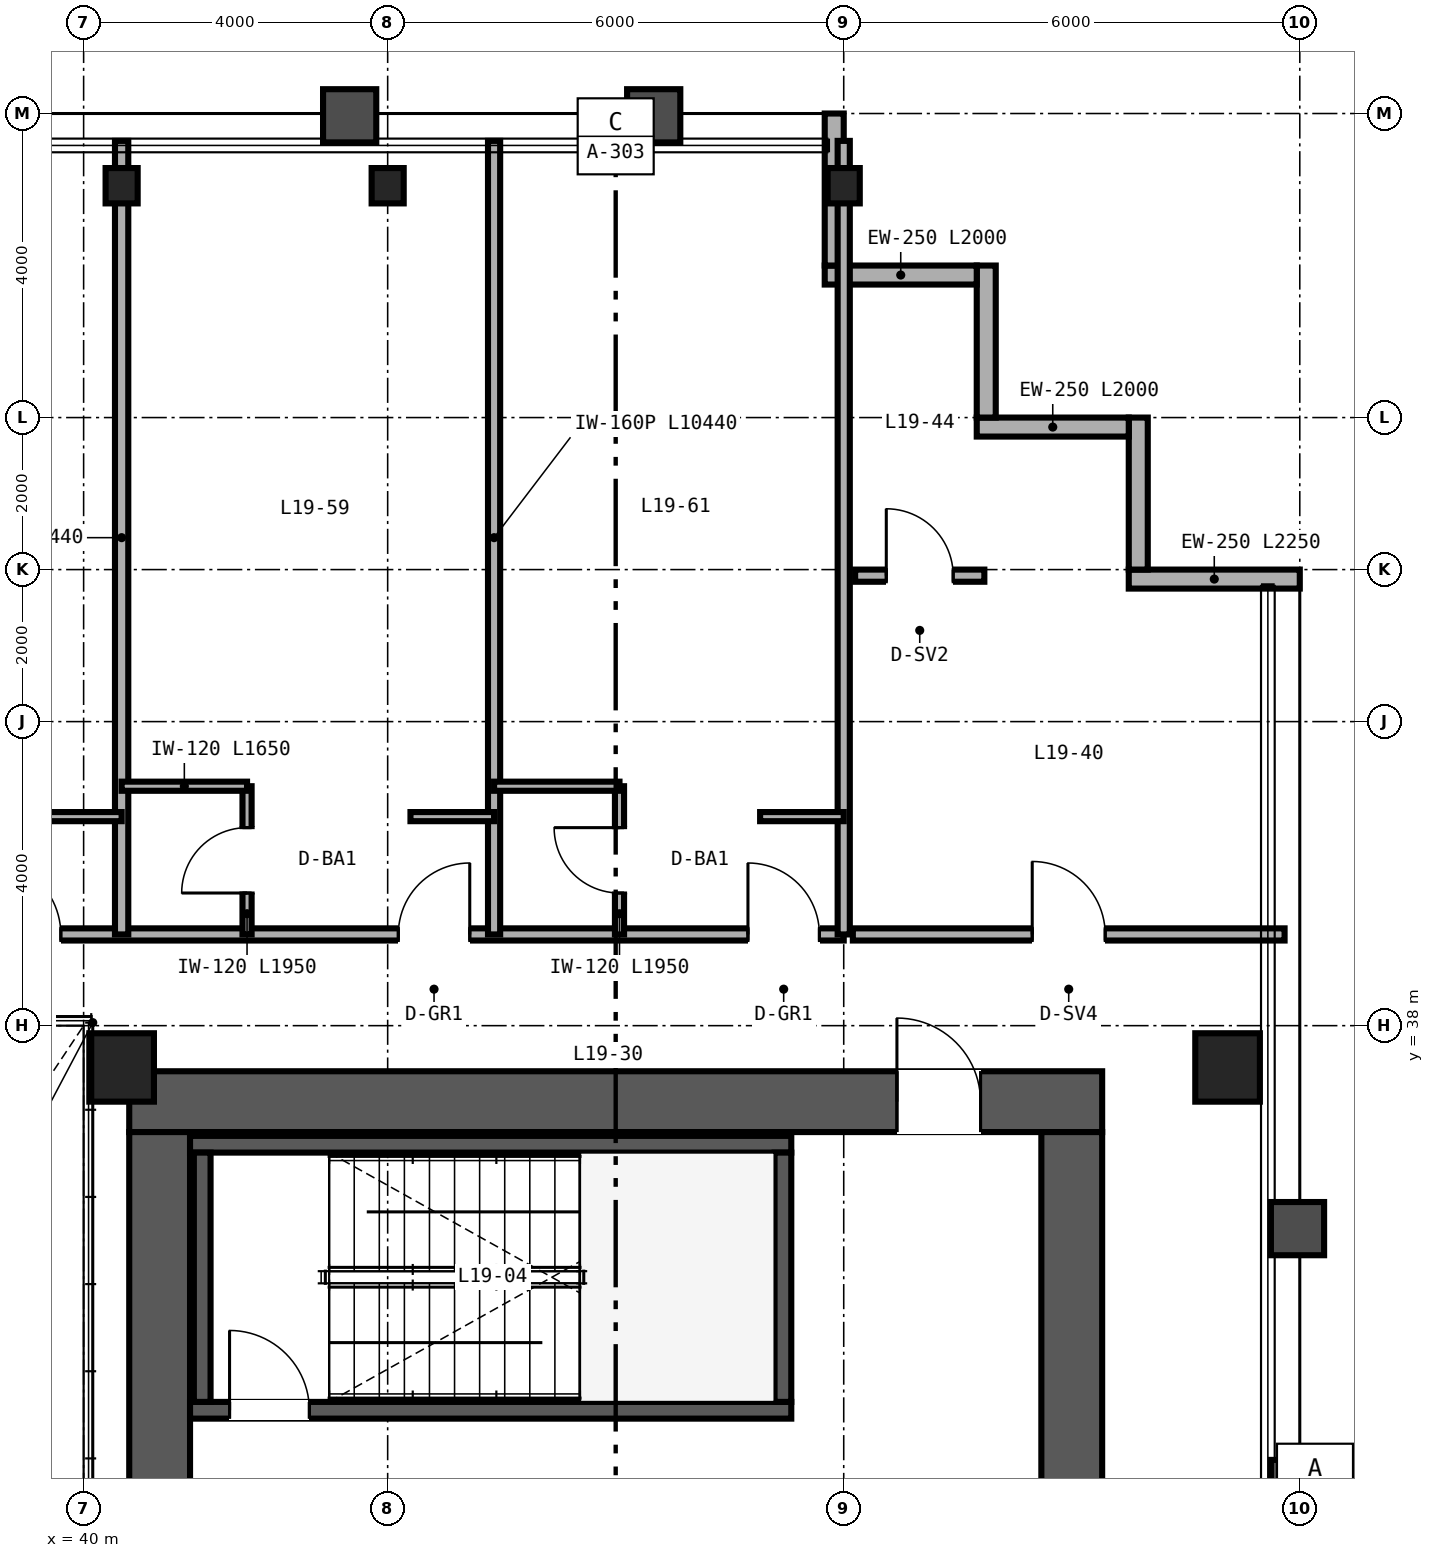
"""IFC4 building model, lengths in metres.
Left out: names, types, materials, properties, quantities, classifications, styles, units other than length and angle.
Written with IfcOpenShell. Run it as: python <this file> out.ifc"""

import sys

from ifc_helpers import new_model, si_unit, direction, frame, frame_2d, origin, origin_2d, place, context, subcontext, project, spatial, rectangle, hollow_rectangle, i_section, extrude, source, transform, mapped, element, fill, save


model = new_model("IFC4")
c1 = context("Model", 3, precision=1e-05, world=origin(), true_north=direction((0.0, 1.0)))
c2 = subcontext(c1, "Body", "Model", "MODEL_VIEW")
j1 = project(units=[si_unit("LENGTHUNIT", "METRE"), si_unit("PLANEANGLEUNIT", "RADIAN")], contexts=[c1])
p1 = place(None, origin())
s1 = spatial("IfcSite", under=j1, at=p1, CompositionType="ELEMENT")
p2 = place(p1, origin())
s2 = spatial("IfcBuilding", under=s1, at=p2, CompositionType="ELEMENT")
p3 = place(p2, frame((0.0, 0.0, 78.0)))
s3 = spatial("IfcBuildingStorey", under=s2, at=p3, CompositionType="ELEMENT", Elevation=78.0)
p4 = place(p3, frame((40.6, 37.0, 0.0), z_axis=(0.0, 0.0, 1.0), x_axis=(1.0, 0.0, 0.0)))
e1 = element("IfcWall", 1, at=p4, inside=s3, PredefinedType="SHEAR", context=c2, shape_type="SweptSolid", body=[
    extrude(rectangle(XDim=12.8, YDim=0.8, at=frame_2d((6.4, 0.0))), origin(), (0.0, 0.0, 1.0), 3.35),
])
p5 = place(p4, frame((10.1, 0.0, 0.0)))
e2 = element("IfcOpeningElement", 2, at=p5, cuts=e1, PredefinedType="OPENING", context=c2, shape_type="SweptSolid", body=[
    extrude(rectangle(XDim=1.1, YDim=2.15, at=frame_2d((0.55, 1.075))), frame((0.0, 0.41, 0.0), z_axis=(0.0, -1.0, 0.0), x_axis=(1.0, 0.0, 0.0)), (0.0, 0.0, 1.0), 0.82),
])
for number, where, z_axis, x_axis in (
    (3, (41.0, 15.4, 0.0), (0.0, 0.0, 1.0), (0.0, 1.0, 0.0)),
    (4, (53.0, 15.4, 0.0), (0.0, 0.0, 1.0), (0.0, 1.0, 0.0)),
):
    element("IfcWall", number, at=place(p3, frame(where, z_axis=z_axis, x_axis=x_axis)), inside=s3, PredefinedType="SHEAR", context=c2, shape_type="SweptSolid", body=[
        extrude(rectangle(XDim=21.2, YDim=0.8, at=frame_2d((10.6, 0.0))), origin(), (0.0, 0.0, 1.0), 3.35),
    ])
p6 = place(p3, frame((41.4, 32.94, 0.0), z_axis=(0.0, 0.0, 1.0), x_axis=(1.0, 0.0, 0.0)))
e5 = element("IfcWall", 5, at=p6, inside=s3, PredefinedType="SHEAR", context=c2, shape_type="SweptSolid", body=[
    extrude(rectangle(XDim=7.91, YDim=0.22, at=frame_2d((3.955, 0.0))), origin(), (0.0, 0.0, 1.0), 3.4),
])
p7 = place(p6, frame((0.52, 0.0, 0.0)))
e6 = element("IfcOpeningElement", 6, at=p7, cuts=e5, PredefinedType="OPENING", context=c2, shape_type="SweptSolid", body=[
    extrude(rectangle(XDim=1.05, YDim=2.15, at=frame_2d((0.525, 1.075))), frame((0.0, 0.12, 0.0), z_axis=(0.0, -1.0, 0.0), x_axis=(1.0, 0.0, 0.0)), (0.0, 0.0, 1.0), 0.24),
])
p8 = place(p3, frame((41.4, 36.44, 0.0), z_axis=(0.0, 0.0, 1.0), x_axis=(1.0, 0.0, 0.0)))
e7 = element("IfcWall", 7, at=p8, inside=s3, PredefinedType="SHEAR", context=c2, shape_type="SweptSolid", body=[
    extrude(rectangle(XDim=7.91, YDim=0.22, at=frame_2d((3.955, 0.0))), origin(), (0.0, 0.0, 1.0), 3.4),
])
for number, where, z_axis, x_axis in (
    (8, (41.56, 33.05, 0.0), (0.0, 0.0, 1.0), (0.0, 1.0, 0.0)),
    (9, (49.2, 33.05, 0.0), (0.0, 0.0, 1.0), (0.0, 1.0, 0.0)),
):
    element("IfcWall", number, at=place(p3, frame(where, z_axis=z_axis, x_axis=x_axis)), inside=s3, PredefinedType="SHEAR", context=c2, shape_type="SweptSolid", body=[
        extrude(rectangle(XDim=3.28, YDim=0.22, at=frame_2d((1.64, 0.0))), origin(), (0.0, 0.0, 1.0), 3.4),
    ])
m1 = source(origin(), c2, "Body", "SweptSolid", [
    extrude(hollow_rectangle(XDim=0.85, YDim=0.9, WallThickness=0.04, at=origin_2d()), origin(), (0.0, 0.0, 1.0), 3.35),
])
for number, where, z_axis, x_axis in (
    (10, (40.5, 37.45, 0.0), (0.0, 0.0, 1.0), (1.0, 0.0, 0.0)),
    (11, (55.05, 37.45, 0.0), (0.0, 0.0, 1.0), (1.0, 0.0, 0.0)),
):
    element("IfcColumn", number, at=place(p3, frame(where, z_axis=z_axis, x_axis=x_axis)), inside=s3, PredefinedType="COLUMN", context=c2, shape_type="MappedRepresentation", body=[
        mapped(m1, transform((0.0, 0.0, 0.0), scale=1.0)),
    ])
m2 = source(origin(), c2, "Body", "SweptSolid", [
    extrude(i_section(OverallWidth=0.422, OverallDepth=0.465, WebThickness=0.045, FlangeThickness=0.073, FilletRadius=0.025, at=origin_2d()), origin(), (0.0, 0.0, 1.0), 3.35),
])
for number, where, z_axis, x_axis in (
    (12, (40.5, 49.05, 0.0), (0.0, 0.0, 1.0), (1.0, 0.0, 0.0)),
    (13, (44.0, 49.05, 0.0), (0.0, 0.0, 1.0), (1.0, 0.0, 0.0)),
    (14, (50.0, 49.05, 0.0), (0.0, 0.0, 1.0), (1.0, 0.0, 0.0)),
):
    element("IfcColumn", number, at=place(p3, frame(where, z_axis=z_axis, x_axis=x_axis)), inside=s3, PredefinedType="COLUMN", context=c2, shape_type="MappedRepresentation", body=[
        mapped(m2, transform((0.0, 0.0, 0.0), scale=1.0)),
    ])
p9 = place(p3, frame((56.0, 43.875, 0.0), z_axis=(0.0, 0.0, 1.0), x_axis=(-1.0, 0.0, 0.0)))
e15 = element("IfcWall", 15, at=p9, inside=s3, PredefinedType="SOLIDWALL", context=c2, shape_type="SweptSolid", body=[
    extrude(rectangle(XDim=2.25, YDim=0.25, at=frame_2d((1.125, 0.0))), origin(), (0.0, 0.0, 1.0), 3.35),
])
for number, where, z_axis, x_axis in (
    (16, (53.875, 44.0, 0.0), (0.0, 0.0, 1.0), (0.0, 1.0, 0.0)),
    (17, (53.75, 45.875, 0.0), (0.0, 0.0, 1.0), (-1.0, 0.0, 0.0)),
    (18, (51.875, 46.0, 0.0), (0.0, 0.0, 1.0), (0.0, 1.0, 0.0)),
    (19, (51.75, 47.875, 0.0), (0.0, 0.0, 1.0), (-1.0, 0.0, 0.0)),
):
    element("IfcWall", number, at=place(p3, frame(where, z_axis=z_axis, x_axis=x_axis)), inside=s3, PredefinedType="SOLIDWALL", context=c2, shape_type="SweptSolid", body=[
        extrude(rectangle(XDim=2.0, YDim=0.25, at=frame_2d((1.0, 0.0))), origin(), (0.0, 0.0, 1.0), 3.35),
    ])
p10 = place(p3, frame((49.875, 48.0, 0.0), z_axis=(0.0, 0.0, 1.0), x_axis=(0.0, 1.0, 0.0)))
e20 = element("IfcWall", 20, at=p10, inside=s3, PredefinedType="SOLIDWALL", context=c2, shape_type="SweptSolid", body=[
    extrude(rectangle(XDim=2.0, YDim=0.25, at=frame_2d((1.0, 0.0))), origin(), (0.0, 0.0, 1.0), 2.657),
])
p11 = place(p3, frame((50.12, 39.2, 0.0), z_axis=(0.0, 0.0, 1.0), x_axis=(1.0, 0.0, 0.0)))
e21 = element("IfcWall", 21, at=p11, inside=s3, PredefinedType="PARTITIONING", context=c2, shape_type="SweptSolid", body=[
    extrude(rectangle(XDim=5.68, YDim=0.16, at=frame_2d((2.84, 0.0))), origin(), (0.0, 0.0, 1.0), 3.35),
])
p12 = place(p11, frame((2.36, 0.0, 0.0)))
e22 = element("IfcOpeningElement", 22, at=p12, cuts=e21, PredefinedType="OPENING", context=c2, shape_type="SweptSolid", body=[
    extrude(rectangle(XDim=0.96, YDim=2.15, at=frame_2d((0.48, 1.075))), frame((0.0, 0.09, 0.0), z_axis=(0.0, -1.0, 0.0), x_axis=(1.0, 0.0, 0.0)), (0.0, 0.0, 1.0), 0.18),
])
p13 = place(p3, frame((50.15, 43.92, 0.0), z_axis=(0.0, 0.0, 1.0), x_axis=(1.0, 0.0, 0.0)))
e23 = element("IfcWall", 23, at=p13, inside=s3, PredefinedType="PARTITIONING", context=c2, shape_type="SweptSolid", body=[
    extrude(rectangle(XDim=1.7, YDim=0.16, at=frame_2d((0.85, 0.0))), origin(), (0.0, 0.0, 1.0), 3.35),
])
p14 = place(p13, frame((0.41, 0.0, 0.0)))
e24 = element("IfcOpeningElement", 24, at=p14, cuts=e23, PredefinedType="OPENING", context=c2, shape_type="SweptSolid", body=[
    extrude(rectangle(XDim=0.88, YDim=2.15, at=frame_2d((0.44, 1.075))), frame((0.0, 0.09, 0.0), z_axis=(0.0, -1.0, 0.0), x_axis=(1.0, 0.0, 0.0)), (0.0, 0.0, 1.0), 0.18),
])
p15 = place(p3, frame((14.0, 39.2, 0.0), z_axis=(0.0, 0.0, 1.0), x_axis=(1.0, 0.0, 0.0)))
e25 = element("IfcWall", 25, at=p15, inside=s3, PredefinedType="PARTITIONING", context=c2, shape_type="SweptSolid", body=[
    extrude(rectangle(XDim=36.0, YDim=0.16, at=frame_2d((18.0, 0.0))), origin(), (0.0, 0.0, 1.0), 2.571),
])
p16 = place(p15, frame((7.7, 0.0, 0.0)))
e26 = element("IfcOpeningElement", 26, at=p16, cuts=e25, PredefinedType="OPENING", context=c2, shape_type="SweptSolid", body=[
    extrude(rectangle(XDim=0.98, YDim=2.2, at=frame_2d((0.49, 1.1))), frame((0.0, 0.09, 0.0), z_axis=(0.0, -1.0, 0.0), x_axis=(1.0, 0.0, 0.0)), (0.0, 0.0, 1.0), 0.18),
])
p17 = place(p15, frame((13.02, 0.0, 0.0)))
e27 = element("IfcOpeningElement", 27, at=p17, cuts=e25, PredefinedType="OPENING", context=c2, shape_type="SweptSolid", body=[
    extrude(rectangle(XDim=0.96, YDim=2.15, at=frame_2d((0.48, 1.075))), frame((0.0, 0.09, 0.0), z_axis=(0.0, -1.0, 0.0), x_axis=(1.0, 0.0, 0.0)), (0.0, 0.0, 1.0), 0.18),
])
p18 = place(p15, frame((24.72, 0.0, 0.0)))
e28 = element("IfcOpeningElement", 28, at=p18, cuts=e25, PredefinedType="OPENING", context=c2, shape_type="SweptSolid", body=[
    extrude(rectangle(XDim=0.98, YDim=2.2, at=frame_2d((0.49, 1.1))), frame((0.0, 0.09, 0.0), z_axis=(0.0, -1.0, 0.0), x_axis=(1.0, 0.0, 0.0)), (0.0, 0.0, 1.0), 0.18),
])
p19 = place(p15, frame((30.14, 0.0, 0.0)))
e29 = element("IfcOpeningElement", 29, at=p19, cuts=e25, PredefinedType="OPENING", context=c2, shape_type="SweptSolid", body=[
    extrude(rectangle(XDim=0.94, YDim=2.15, at=frame_2d((0.47, 1.075))), frame((0.0, 0.09, 0.0), z_axis=(0.0, -1.0, 0.0), x_axis=(1.0, 0.0, 0.0)), (0.0, 0.0, 1.0), 0.18),
])
p20 = place(p15, frame((34.74, 0.0, 0.0)))
e30 = element("IfcOpeningElement", 30, at=p20, cuts=e25, PredefinedType="OPENING", context=c2, shape_type="SweptSolid", body=[
    extrude(rectangle(XDim=0.94, YDim=2.15, at=frame_2d((0.47, 1.075))), frame((0.0, 0.09, 0.0), z_axis=(0.0, -1.0, 0.0), x_axis=(1.0, 0.0, 0.0)), (0.0, 0.0, 1.0), 0.18),
])
p21 = place(p3, frame((50.0, 39.2, 0.0), z_axis=(0.0, 0.0, 1.0), x_axis=(0.0, 1.0, 0.0)))
e31 = element("IfcWall", 31, at=p21, inside=s3, PredefinedType="PARTITIONING", context=c2, shape_type="SweptSolid", body=[
    extrude(rectangle(XDim=10.44, YDim=0.16, at=frame_2d((5.22, 0.0))), origin(), (0.0, 0.0, 1.0), 2.657),
])
p22 = place(p3, frame((40.5, 39.2, 0.0), z_axis=(0.0, 0.0, 1.0), x_axis=(0.0, 1.0, 0.0)))
e32 = element("IfcWall", 32, at=p22, inside=s3, PredefinedType="PARTITIONING", context=c2, shape_type="SweptSolid", body=[
    extrude(rectangle(XDim=10.44, YDim=0.175, at=frame_2d((5.22, 0.0))), origin(), (0.0, 0.0, 1.0), 2.423),
])
p23 = place(p3, frame((39.4, 40.75, 0.0), z_axis=(0.0, 0.0, 1.0), x_axis=(1.0, 0.0, 0.0)))
e33 = element("IfcWall", 33, at=p23, inside=s3, PredefinedType="PARTITIONING", context=c2, shape_type="SweptSolid", body=[
    extrude(rectangle(XDim=1.1, YDim=0.12, at=frame_2d((0.55, 0.0))), origin(), (0.0, 0.0, 1.0), 2.571),
])
p24 = place(p3, frame((45.4, 39.2, 0.0), z_axis=(0.0, 0.0, 1.0), x_axis=(0.0, 1.0, 0.0)))
e34 = element("IfcWall", 34, at=p24, inside=s3, PredefinedType="PARTITIONING", context=c2, shape_type="SweptSolid", body=[
    extrude(rectangle(XDim=10.44, YDim=0.16, at=frame_2d((5.22, 0.0))), origin(), (0.0, 0.0, 1.0), 2.657),
])
p25 = place(p3, frame((42.15, 39.2, 0.0), z_axis=(0.0, 0.0, 1.0), x_axis=(0.0, 1.0, 0.0)))
e35 = element("IfcWall", 35, at=p25, inside=s3, PredefinedType="PARTITIONING", context=c2, shape_type="SweptSolid", body=[
    extrude(rectangle(XDim=1.95, YDim=0.12, at=frame_2d((0.975, 0.0))), origin(), (0.0, 0.0, 1.0), 3.35),
])
p26 = place(p25, frame((0.545, 0.0, 0.0)))
e36 = element("IfcOpeningElement", 36, at=p26, cuts=e35, PredefinedType="OPENING", context=c2, shape_type="SweptSolid", body=[
    extrude(rectangle(XDim=0.86, YDim=2.1, at=frame_2d((0.43, 1.05))), frame((0.0, 0.07, 0.0), z_axis=(0.0, -1.0, 0.0), x_axis=(1.0, 0.0, 0.0)), (0.0, 0.0, 1.0), 0.14),
])
p27 = place(p3, frame((40.5, 41.15, 0.0), z_axis=(0.0, 0.0, 1.0), x_axis=(1.0, 0.0, 0.0)))
e37 = element("IfcWall", 37, at=p27, inside=s3, PredefinedType="PARTITIONING", context=c2, shape_type="SweptSolid", body=[
    extrude(rectangle(XDim=1.65, YDim=0.12, at=frame_2d((0.825, 0.0))), origin(), (0.0, 0.0, 1.0), 2.571),
])
p28 = place(p3, frame((44.3, 40.75, 0.0), z_axis=(0.0, 0.0, 1.0), x_axis=(1.0, 0.0, 0.0)))
e38 = element("IfcWall", 38, at=p28, inside=s3, PredefinedType="PARTITIONING", context=c2, shape_type="SweptSolid", body=[
    extrude(rectangle(XDim=1.1, YDim=0.12, at=frame_2d((0.55, 0.0))), origin(), (0.0, 0.0, 1.0), 3.35),
])
p29 = place(p3, frame((47.05, 39.2, 0.0), z_axis=(0.0, 0.0, 1.0), x_axis=(0.0, 1.0, 0.0)))
e39 = element("IfcWall", 39, at=p29, inside=s3, PredefinedType="PARTITIONING", context=c2, shape_type="SweptSolid", body=[
    extrude(rectangle(XDim=1.95, YDim=0.12, at=frame_2d((0.975, 0.0))), origin(), (0.0, 0.0, 1.0), 3.35),
])
p30 = place(p29, frame((0.545, 0.0, 0.0)))
e40 = element("IfcOpeningElement", 40, at=p30, cuts=e39, PredefinedType="OPENING", context=c2, shape_type="SweptSolid", body=[
    extrude(rectangle(XDim=0.86, YDim=2.1, at=frame_2d((0.43, 1.05))), frame((0.0, 0.07, 0.0), z_axis=(0.0, -1.0, 0.0), x_axis=(1.0, 0.0, 0.0)), (0.0, 0.0, 1.0), 0.14),
])
p31 = place(p3, frame((45.4, 41.15, 0.0), z_axis=(0.0, 0.0, 1.0), x_axis=(1.0, 0.0, 0.0)))
e41 = element("IfcWall", 41, at=p31, inside=s3, PredefinedType="PARTITIONING", context=c2, shape_type="SweptSolid", body=[
    extrude(rectangle(XDim=1.65, YDim=0.12, at=frame_2d((0.825, 0.0))), origin(), (0.0, 0.0, 1.0), 3.35),
])
p32 = place(p3, frame((48.9, 40.75, 0.0), z_axis=(0.0, 0.0, 1.0), x_axis=(1.0, 0.0, 0.0)))
e42 = element("IfcWall", 42, at=p32, inside=s3, PredefinedType="PARTITIONING", context=c2, shape_type="SweptSolid", body=[
    extrude(rectangle(XDim=1.1, YDim=0.12, at=frame_2d((0.55, 0.0))), origin(), (0.0, 0.0, 1.0), 3.35),
])
m3 = source(origin(), c2, "Body", "SweptSolid", [
    extrude(rectangle(XDim=1.05, YDim=2.15, at=frame_2d((0.525, 1.075))), frame((0.0, 0.025, 0.0), z_axis=(0.0, -1.0, 0.0), x_axis=(1.0, 0.0, 0.0)), (0.0, 0.0, 1.0), 0.05),
])
p33 = place(p7, origin())
e43 = element("IfcDoor", 43, at=p33, inside=s3, OperationType="SINGLE_SWING_LEFT", PredefinedType="DOOR", context=c2, shape_type="MappedRepresentation", body=[
    mapped(m3, transform((0.0, 0.0, 0.0), scale=1.0)),
])
fill(e6, e43)
m4 = source(origin(), c2, "Body", "SweptSolid", [
    extrude(rectangle(XDim=1.1, YDim=2.15, at=frame_2d((0.55, 1.075))), frame((0.0, 0.025, 0.0), z_axis=(0.0, -1.0, 0.0), x_axis=(1.0, 0.0, 0.0)), (0.0, 0.0, 1.0), 0.05),
])
p34 = place(p5, origin())
e44 = element("IfcDoor", 44, at=p34, inside=s3, OperationType="SINGLE_SWING_LEFT", PredefinedType="DOOR", context=c2, shape_type="MappedRepresentation", body=[
    mapped(m4, transform((0.0, 0.0, 0.0), scale=1.0)),
])
fill(e2, e44)
m5 = source(origin(), c2, "Body", "SweptSolid", [
    extrude(rectangle(XDim=0.96, YDim=2.15, at=frame_2d((0.48, 1.075))), frame((0.0, 0.025, 0.0), z_axis=(0.0, -1.0, 0.0), x_axis=(1.0, 0.0, 0.0)), (0.0, 0.0, 1.0), 0.05),
])
p35 = place(p12, origin())
e45 = element("IfcDoor", 45, at=p35, inside=s3, OperationType="SINGLE_SWING_LEFT", PredefinedType="DOOR", context=c2, shape_type="MappedRepresentation", body=[
    mapped(m5, transform((0.0, 0.0, 0.0), scale=1.0)),
])
fill(e22, e45)
m6 = source(origin(), c2, "Body", "SweptSolid", [
    extrude(rectangle(XDim=0.88, YDim=2.15, at=frame_2d((0.44, 1.075))), frame((0.0, 0.025, 0.0), z_axis=(0.0, -1.0, 0.0), x_axis=(1.0, 0.0, 0.0)), (0.0, 0.0, 1.0), 0.05),
])
p36 = place(p14, origin())
e46 = element("IfcDoor", 46, at=p36, inside=s3, OperationType="SINGLE_SWING_LEFT", PredefinedType="DOOR", context=c2, shape_type="MappedRepresentation", body=[
    mapped(m6, transform((0.0, 0.0, 0.0), scale=1.0)),
])
fill(e24, e46)
m7 = source(origin(), c2, "Body", "SweptSolid", [
    extrude(rectangle(XDim=0.86, YDim=2.1, at=frame_2d((0.43, 1.05))), frame((0.0, 0.025, 0.0), z_axis=(0.0, -1.0, 0.0), x_axis=(1.0, 0.0, 0.0)), (0.0, 0.0, 1.0), 0.05),
])
p37 = place(p26, origin())
e47 = element("IfcDoor", 47, at=p37, inside=s3, OperationType="SINGLE_SWING_LEFT", PredefinedType="DOOR", context=c2, shape_type="MappedRepresentation", body=[
    mapped(m7, transform((0.0, 0.0, 0.0), scale=1.0)),
])
fill(e36, e47)
p38 = place(p30, origin())
e48 = element("IfcDoor", 48, at=p38, inside=s3, OperationType="SINGLE_SWING_RIGHT", PredefinedType="DOOR", context=c2, shape_type="MappedRepresentation", body=[
    mapped(m7, transform((0.0, 0.0, 0.0), scale=1.0)),
])
fill(e40, e48)
m8 = source(origin(), c2, "Body", "SweptSolid", [
    extrude(rectangle(XDim=0.98, YDim=2.2, at=frame_2d((0.49, 1.1))), frame((0.0, 0.025, 0.0), z_axis=(0.0, -1.0, 0.0), x_axis=(1.0, 0.0, 0.0)), (0.0, 0.0, 1.0), 0.05),
])
p39 = place(p18, origin())
e49 = element("IfcDoor", 49, at=p39, inside=s3, OperationType="SINGLE_SWING_LEFT", PredefinedType="DOOR", context=c2, shape_type="MappedRepresentation", body=[
    mapped(m8, transform((0.0, 0.0, 0.0), scale=1.0)),
])
fill(e28, e49)
m9 = source(origin(), c2, "Body", "SweptSolid", [
    extrude(rectangle(XDim=0.94, YDim=2.15, at=frame_2d((0.47, 1.075))), frame((0.0, 0.025, 0.0), z_axis=(0.0, -1.0, 0.0), x_axis=(1.0, 0.0, 0.0)), (0.0, 0.0, 1.0), 0.05),
])
p40 = place(p19, origin())
e50 = element("IfcDoor", 50, at=p40, inside=s3, OperationType="SINGLE_SWING_RIGHT", PredefinedType="DOOR", context=c2, shape_type="MappedRepresentation", body=[
    mapped(m9, transform((0.0, 0.0, 0.0), scale=1.0)),
])
fill(e29, e50)
p41 = place(p20, origin())
e51 = element("IfcDoor", 51, at=p41, inside=s3, OperationType="SINGLE_SWING_LEFT", PredefinedType="DOOR", context=c2, shape_type="MappedRepresentation", body=[
    mapped(m9, transform((0.0, 0.0, 0.0), scale=1.0)),
])
fill(e30, e51)
save(model, sys.argv[1])
